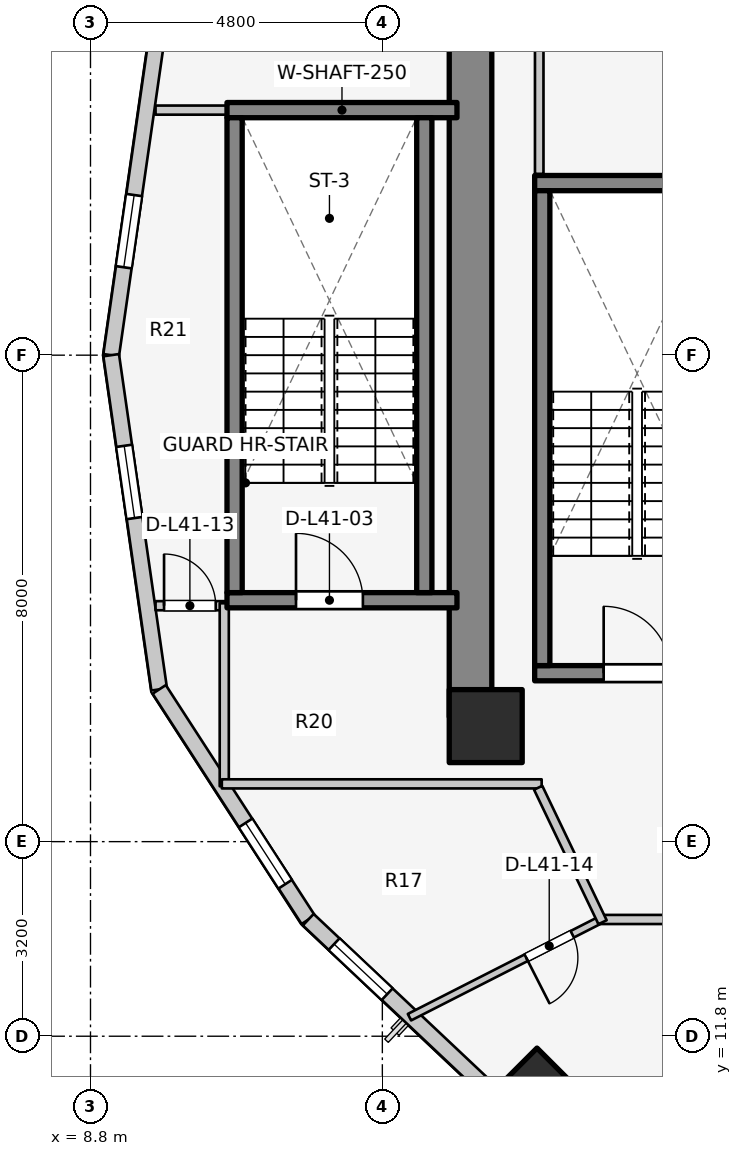
"""IFC4 building model, lengths in metres.
Left out: names, types, materials, properties, quantities, classifications, styles, units other than length and angle.
Written with IfcOpenShell. Run it as: python <this file> out.ifc"""

import sys

from ifc_helpers import new_model, si_unit, direction, frame, frame_2d, origin, origin_2d, place, context, subcontext, project, spatial, rectangle, extrude, element, fill, save


model = new_model("IFC4")
c1 = context("Model", 3, precision=1e-05, world=origin(), true_north=direction((0.0, 1.0)))
c2 = subcontext(c1, "Body", "Model", "MODEL_VIEW")
j1 = project(units=[si_unit("LENGTHUNIT", "METRE"), si_unit("PLANEANGLEUNIT", "RADIAN")], contexts=[c1])
p1 = place(None, origin())
s1 = spatial("IfcSite", under=j1, at=p1, CompositionType="ELEMENT")
p2 = place(p1, origin())
s2 = spatial("IfcBuilding", under=s1, at=p2, CompositionType="ELEMENT")
p3 = place(p2, frame((0.0, 0.0, 137.4)))
s3 = spatial("IfcBuildingStorey", under=s2, at=p3, CompositionType="ELEMENT", Elevation=137.4)
p4 = place(p3, frame((15.05, 17.05, 0.0), z_axis=(0.0, 0.0, 1.0), x_axis=(0.0, 1.0, 0.0)))
e1 = element("IfcWall", 1, at=p4, inside=s3, PredefinedType="SHEAR", context=c2, shape_type="SweptSolid", body=[
    extrude(rectangle(XDim=12.8, YDim=0.7, at=frame_2d((6.4, 0.0))), origin(), (0.0, 0.0, 1.0), 3.1),
])
p5 = place(p3, frame((16.105, 17.77, 0.0), z_axis=(0.0, 0.0, 1.0), x_axis=(1.0, 0.0, 0.0)))
e2 = element("IfcWall", 2, at=p5, inside=s3, PredefinedType="SOLIDWALL", context=c2, shape_type="SweptSolid", body=[
    extrude(rectangle(XDim=3.37, YDim=0.25, at=frame_2d((1.685, 0.0))), origin(), (0.0, 0.0, 1.0), 3.1),
])
p6 = place(p5, frame((1.135, 0.0, 0.0)))
e3 = element("IfcOpeningElement", 3, at=p6, cuts=e2, PredefinedType="OPENING", context=c2, shape_type="SweptSolid", body=[
    extrude(rectangle(XDim=1.1, YDim=2.1, at=frame_2d((0.55, 1.05))), frame((0.0, 0.135, 0.0), z_axis=(0.0, -1.0, 0.0), x_axis=(1.0, 0.0, 0.0)), (0.0, 0.0, 1.0), 0.27),
])
p7 = place(p3, frame((16.105, 25.83, 0.0), z_axis=(0.0, 0.0, 1.0), x_axis=(1.0, 0.0, 0.0)))
e4 = element("IfcWall", 4, at=p7, inside=s3, PredefinedType="SOLIDWALL", context=c2, shape_type="SweptSolid", body=[
    extrude(rectangle(XDim=3.37, YDim=0.25, at=frame_2d((1.685, 0.0))), origin(), (0.0, 0.0, 1.0), 3.1),
])
p8 = place(p3, frame((16.23, 17.895, 0.0), z_axis=(0.0, 0.0, 1.0), x_axis=(0.0, 1.0, 0.0)))
e5 = element("IfcWall", 5, at=p8, inside=s3, PredefinedType="SOLIDWALL", context=c2, shape_type="SweptSolid", body=[
    extrude(rectangle(XDim=7.81, YDim=0.25, at=frame_2d((3.905, 0.0))), origin(), (0.0, 0.0, 1.0), 3.1),
])
p9 = place(p3, frame((11.045, 18.97, 0.0), z_axis=(0.0, 0.0, 1.0), x_axis=(1.0, 0.0, 0.0)))
e6 = element("IfcWall", 6, at=p9, inside=s3, PredefinedType="SOLIDWALL", context=c2, shape_type="SweptSolid", body=[
    extrude(rectangle(XDim=3.782, YDim=0.25, at=frame_2d((1.891, 0.0))), origin(), (0.0, 0.0, 1.0), 3.1),
])
p10 = place(p9, frame((1.135, 0.0, 0.0)))
e7 = element("IfcOpeningElement", 7, at=p10, cuts=e6, PredefinedType="OPENING", context=c2, shape_type="SweptSolid", body=[
    extrude(rectangle(XDim=1.1, YDim=2.1, at=frame_2d((0.55, 1.05))), frame((0.0, 0.135, 0.0), z_axis=(0.0, -1.0, 0.0), x_axis=(1.0, 0.0, 0.0)), (0.0, 0.0, 1.0), 0.27),
])
p11 = place(p3, frame((11.045, 27.03, 0.0), z_axis=(0.0, 0.0, 1.0), x_axis=(1.0, 0.0, 0.0)))
e8 = element("IfcWall", 8, at=p11, inside=s3, PredefinedType="SOLIDWALL", context=c2, shape_type="SweptSolid", body=[
    extrude(rectangle(XDim=3.782, YDim=0.25, at=frame_2d((1.891, 0.0))), origin(), (0.0, 0.0, 1.0), 3.1),
])
for number, where, z_axis, x_axis in (
    (9, (11.17, 19.095, 0.0), (0.0, 0.0, 1.0), (0.0, 1.0, 0.0)),
    (10, (14.29, 19.095, 0.0), (0.0, 0.0, 1.0), (0.0, 1.0, 0.0)),
):
    element("IfcWall", number, at=place(p3, frame(where, z_axis=z_axis, x_axis=x_axis)), inside=s3, PredefinedType="SOLIDWALL", context=c2, shape_type="SweptSolid", body=[
        extrude(rectangle(XDim=7.81, YDim=0.25, at=frame_2d((3.905, 0.0))), origin(), (0.0, 0.0, 1.0), 3.1),
    ])
p12 = place(p3, frame((15.3, 16.9, 0.0), z_axis=(0.0, 0.0, 1.0), x_axis=(1.0, 0.0, 0.0)))
e11 = element("IfcColumn", 11, at=p12, inside=s3, PredefinedType="COLUMN", context=c2, shape_type="SweptSolid", body=[
    extrude(rectangle(XDim=1.2, YDim=1.2, at=origin_2d()), origin(), (0.0, 0.0, 1.0), 3.1),
])
p13 = place(p3, frame((16.143, 10.969, 0.0), z_axis=(0.0, 0.0, 1.0), x_axis=(-0.707106781187, -0.707106781187, 0.0)))
e12 = element("IfcColumn", 12, at=p13, inside=s3, PredefinedType="COLUMN", context=c2, shape_type="SweptSolid", body=[
    extrude(rectangle(XDim=0.9, YDim=0.9, at=origin_2d()), origin(), (0.0, 0.0, 1.0), 3.1),
])
p14 = place(p3, frame((9.93, 28.497, 0.0), z_axis=(0.0, 0.0, 1.0), x_axis=(-0.142227632286, -0.989833976288, 0.0)))
e13 = element("IfcWall", 13, at=p14, inside=s3, PredefinedType="STANDARD", context=c2, shape_type="SweptSolid", body=[
    extrude(rectangle(XDim=5.553, YDim=0.26, at=frame_2d((2.776, 0.0))), origin(), (0.0, 0.0, 1.0), 2.85),
])
p15 = place(p14, frame((2.892, 0.0, 0.75)))
e14 = element("IfcOpeningElement", 14, at=p15, cuts=e13, PredefinedType="OPENING", context=c2, shape_type="SweptSolid", body=[
    extrude(rectangle(XDim=1.2, YDim=1.5, at=frame_2d((0.6, 0.75))), frame((0.0, 0.14, 0.0), z_axis=(0.0, -1.0, 0.0), x_axis=(1.0, 0.0, 0.0)), (0.0, 0.0, 1.0), 0.28),
])
p16 = place(p3, frame((9.14, 23.0, 0.0), z_axis=(0.0, 0.0, 1.0), x_axis=(0.142227632286, -0.989833976288, 0.0)))
e15 = element("IfcWall", 15, at=p16, inside=s3, PredefinedType="STANDARD", context=c2, shape_type="SweptSolid", body=[
    extrude(rectangle(XDim=5.553, YDim=0.26, at=frame_2d((2.776, 0.0))), origin(), (0.0, 0.0, 1.0), 2.85),
])
p17 = place(p16, frame((1.506, 0.0, 0.75)))
e16 = element("IfcOpeningElement", 16, at=p17, cuts=e15, PredefinedType="OPENING", context=c2, shape_type="SweptSolid", body=[
    extrude(rectangle(XDim=1.2, YDim=1.5, at=frame_2d((0.6, 0.75))), frame((0.0, 0.14, 0.0), z_axis=(0.0, -1.0, 0.0), x_axis=(1.0, 0.0, 0.0)), (0.0, 0.0, 1.0), 0.28),
])
p18 = place(p3, frame((9.93, 17.503, 0.0), z_axis=(0.0, 0.0, 1.0), x_axis=(0.543358984534, -0.839500454989, 0.0)))
e17 = element("IfcWall", 17, at=p18, inside=s3, PredefinedType="STANDARD", context=c2, shape_type="SweptSolid", body=[
    extrude(rectangle(XDim=4.511, YDim=0.26, at=frame_2d((2.256, 0.0))), origin(), (0.0, 0.0, 1.0), 2.85),
])
p19 = place(p18, frame((2.615, 0.0, 0.75)))
e18 = element("IfcOpeningElement", 18, at=p19, cuts=e17, PredefinedType="OPENING", context=c2, shape_type="SweptSolid", body=[
    extrude(rectangle(XDim=1.2, YDim=1.5, at=frame_2d((0.6, 0.75))), frame((0.0, 0.14, 0.0), z_axis=(0.0, -1.0, 0.0), x_axis=(1.0, 0.0, 0.0)), (0.0, 0.0, 1.0), 0.28),
])
p20 = place(p3, frame((12.381, 13.716, 0.0), z_axis=(0.0, 0.0, 1.0), x_axis=(0.727667301037, -0.68593024354, 0.0)))
e19 = element("IfcWall", 19, at=p20, inside=s3, PredefinedType="STANDARD", context=c2, shape_type="SweptSolid", body=[
    extrude(rectangle(XDim=4.604, YDim=0.26, at=frame_2d((2.302, 0.0))), origin(), (0.0, 0.0, 1.0), 2.85),
])
p21 = place(p20, frame((0.585, 0.0, 0.75)))
e20 = element("IfcOpeningElement", 20, at=p21, cuts=e19, PredefinedType="OPENING", context=c2, shape_type="SweptSolid", body=[
    extrude(rectangle(XDim=1.2, YDim=1.5, at=frame_2d((0.6, 0.75))), frame((0.0, 0.14, 0.0), z_axis=(0.0, -1.0, 0.0), x_axis=(1.0, 0.0, 0.0)), (0.0, 0.0, 1.0), 0.28),
])
p22 = place(p3, frame((16.18, 25.98, 0.0), z_axis=(0.0, 0.0, 1.0), x_axis=(0.0, 1.0, 0.0)))
e21 = element("IfcWall", 21, at=p22, inside=s3, PredefinedType="PLUMBINGWALL", context=c2, shape_type="SweptSolid", body=[
    extrude(rectangle(XDim=3.88, YDim=0.14, at=frame_2d((1.94, 0.0))), origin(), (0.0, 0.0, 1.0), 2.855),
])
p23 = place(p3, frame((9.87, 27.03, 0.0), z_axis=(0.0, 0.0, 1.0), x_axis=(1.0, 0.0, 0.0)))
e22 = element("IfcWall", 22, at=p23, inside=s3, PredefinedType="PARTITIONING", context=c2, shape_type="SweptSolid", body=[
    extrude(rectangle(XDim=1.17, YDim=0.15, at=frame_2d((0.585, 0.0))), origin(), (0.0, 0.0, 1.0), 2.855),
])
p24 = place(p3, frame((9.87, 18.88, 0.0), z_axis=(0.0, 0.0, 1.0), x_axis=(1.0, 0.0, 0.0)))
e23 = element("IfcWall", 23, at=p24, inside=s3, PredefinedType="PARTITIONING", context=c2, shape_type="SweptSolid", body=[
    extrude(rectangle(XDim=1.17, YDim=0.15, at=frame_2d((0.585, 0.0))), origin(), (0.0, 0.0, 1.0), 2.855),
])
p25 = place(p24, frame((0.14, 0.0, 0.0)))
e24 = element("IfcOpeningElement", 24, at=p25, cuts=e23, PredefinedType="OPENING", context=c2, shape_type="SweptSolid", body=[
    extrude(rectangle(XDim=0.85, YDim=2.05, at=frame_2d((0.425, 1.025))), frame((0.0, 0.085, 0.0), z_axis=(0.0, -1.0, 0.0), x_axis=(1.0, 0.0, 0.0)), (0.0, 0.0, 1.0), 0.17),
])
p26 = place(p3, frame((11.0, 15.91, 0.0), z_axis=(0.0, 0.0, 1.0), x_axis=(0.0, 1.0, 0.0)))
e25 = element("IfcWall", 25, at=p26, inside=s3, PredefinedType="PARTITIONING", context=c2, shape_type="SweptSolid", body=[
    extrude(rectangle(XDim=3.01, YDim=0.15, at=frame_2d((1.505, 0.0))), origin(), (0.0, 0.0, 1.0), 2.855),
])
p27 = place(p3, frame((10.96, 15.95, 0.0), z_axis=(0.0, 0.0, 1.0), x_axis=(1.0, 0.0, 0.0)))
e26 = element("IfcWall", 26, at=p27, inside=s3, PredefinedType="PARTITIONING", context=c2, shape_type="SweptSolid", body=[
    extrude(rectangle(XDim=5.26, YDim=0.15, at=frame_2d((2.63, 0.0))), origin(), (0.0, 0.0, 1.0), 2.22),
])
p28 = place(p3, frame((17.245, 13.743, 0.0), z_axis=(0.0, 0.0, 1.0), x_axis=(-0.891028597788, -0.453947175258, 0.0)))
e27 = element("IfcWall", 27, at=p28, inside=s3, PredefinedType="MOVABLE", context=c2, shape_type="SweptSolid", body=[
    extrude(rectangle(XDim=3.59, YDim=0.12, at=frame_2d((1.795, 0.0))), origin(), (0.0, 0.0, 1.0), 2.22),
])
p29 = place(p28, frame((0.585, 0.0, 0.0)))
e28 = element("IfcOpeningElement", 28, at=p29, cuts=e27, PredefinedType="OPENING", context=c2, shape_type="SweptSolid", body=[
    extrude(rectangle(XDim=0.85, YDim=2.05, at=frame_2d((0.425, 1.025))), frame((0.0, 0.07, 0.0), z_axis=(0.0, -1.0, 0.0), x_axis=(1.0, 0.0, 0.0)), (0.0, 0.0, 1.0), 0.14),
])
p30 = place(p3, frame((17.15, 13.72, 0.0), z_axis=(0.0, 0.0, 1.0), x_axis=(1.0, 0.0, 0.0)))
e29 = element("IfcWall", 29, at=p30, inside=s3, PredefinedType="PARTITIONING", context=c2, shape_type="SweptSolid", body=[
    extrude(rectangle(XDim=7.52, YDim=0.15, at=frame_2d((3.76, 0.0))), origin(), (0.0, 0.0, 1.0), 2.299),
])
p31 = place(p30, frame((1.3, 0.0, 0.0)))
e30 = element("IfcOpeningElement", 30, at=p31, cuts=e29, PredefinedType="OPENING", context=c2, shape_type="SweptSolid", body=[
    extrude(rectangle(XDim=0.9, YDim=2.1, at=frame_2d((0.45, 1.05))), frame((0.0, 0.085, 0.0), z_axis=(0.0, -1.0, 0.0), x_axis=(1.0, 0.0, 0.0)), (0.0, 0.0, 1.0), 0.17),
])
p32 = place(p3, frame((17.222, 13.675, 0.0), z_axis=(0.0, 0.0, 1.0), x_axis=(-0.431973389813, 0.901886351207, 0.0)))
e31 = element("IfcWall", 31, at=p32, inside=s3, PredefinedType="PARTITIONING", context=c2, shape_type="SweptSolid", body=[
    extrude(rectangle(XDim=2.452, YDim=0.15, at=frame_2d((1.226, 0.0))), origin(), (0.0, 0.0, 1.0), 2.855),
])
p33 = place(p15, origin())
e32 = element("IfcWindow", 32, at=p33, inside=s3, PartitioningType="SINGLE_PANEL", PredefinedType="WINDOW", context=c2, shape_type="SweptSolid", body=[
    extrude(rectangle(XDim=1.2, YDim=1.5, at=frame_2d((0.6, 0.75))), frame((0.0, 0.03, 0.0), z_axis=(0.0, -1.0, 0.0), x_axis=(1.0, 0.0, 0.0)), (0.0, 0.0, 1.0), 0.06),
])
fill(e14, e32)
p34 = place(p17, origin())
e33 = element("IfcWindow", 33, at=p34, inside=s3, PartitioningType="SINGLE_PANEL", PredefinedType="WINDOW", context=c2, shape_type="SweptSolid", body=[
    extrude(rectangle(XDim=1.2, YDim=1.5, at=frame_2d((0.6, 0.75))), frame((0.0, 0.03, 0.0), z_axis=(0.0, -1.0, 0.0), x_axis=(1.0, 0.0, 0.0)), (0.0, 0.0, 1.0), 0.06),
])
fill(e16, e33)
p35 = place(p19, origin())
e34 = element("IfcWindow", 34, at=p35, inside=s3, PartitioningType="SINGLE_PANEL", PredefinedType="WINDOW", context=c2, shape_type="SweptSolid", body=[
    extrude(rectangle(XDim=1.2, YDim=1.5, at=frame_2d((0.6, 0.75))), frame((0.0, 0.03, 0.0), z_axis=(0.0, -1.0, 0.0), x_axis=(1.0, 0.0, 0.0)), (0.0, 0.0, 1.0), 0.06),
])
fill(e18, e34)
p36 = place(p21, origin())
e35 = element("IfcWindow", 35, at=p36, inside=s3, PartitioningType="SINGLE_PANEL", PredefinedType="WINDOW", context=c2, shape_type="SweptSolid", body=[
    extrude(rectangle(XDim=1.2, YDim=1.5, at=frame_2d((0.6, 0.75))), frame((0.0, 0.03, 0.0), z_axis=(0.0, -1.0, 0.0), x_axis=(1.0, 0.0, 0.0)), (0.0, 0.0, 1.0), 0.06),
])
fill(e20, e35)
p37 = place(p6, origin())
e36 = element("IfcDoor", 36, at=p37, inside=s3, OperationType="SINGLE_SWING_LEFT", PredefinedType="DOOR", context=c2, shape_type="SweptSolid", body=[
    extrude(rectangle(XDim=1.1, YDim=2.1, at=frame_2d((0.55, 1.05))), frame((0.0, 0.025, 0.0), z_axis=(0.0, -1.0, 0.0), x_axis=(1.0, 0.0, 0.0)), (0.0, 0.0, 1.0), 0.05),
])
fill(e3, e36)
p38 = place(p10, origin())
e37 = element("IfcDoor", 37, at=p38, inside=s3, OperationType="SINGLE_SWING_LEFT", PredefinedType="DOOR", context=c2, shape_type="SweptSolid", body=[
    extrude(rectangle(XDim=1.1, YDim=2.1, at=frame_2d((0.55, 1.05))), frame((0.0, 0.025, 0.0), z_axis=(0.0, -1.0, 0.0), x_axis=(1.0, 0.0, 0.0)), (0.0, 0.0, 1.0), 0.05),
])
fill(e7, e37)
p39 = place(p25, origin())
e38 = element("IfcDoor", 38, at=p39, inside=s3, OperationType="SINGLE_SWING_LEFT", PredefinedType="DOOR", context=c2, shape_type="SweptSolid", body=[
    extrude(rectangle(XDim=0.85, YDim=2.05, at=frame_2d((0.425, 1.025))), frame((0.0, 0.025, 0.0), z_axis=(0.0, -1.0, 0.0), x_axis=(1.0, 0.0, 0.0)), (0.0, 0.0, 1.0), 0.05),
])
fill(e24, e38)
p40 = place(p29, origin())
e39 = element("IfcDoor", 39, at=p40, inside=s3, OperationType="SINGLE_SWING_RIGHT", PredefinedType="DOOR", context=c2, shape_type="SweptSolid", body=[
    extrude(rectangle(XDim=0.85, YDim=2.05, at=frame_2d((0.425, 1.025))), frame((0.0, 0.025, 0.0), z_axis=(0.0, -1.0, 0.0), x_axis=(1.0, 0.0, 0.0)), (0.0, 0.0, 1.0), 0.05),
])
fill(e28, e39)
save(model, sys.argv[1])
